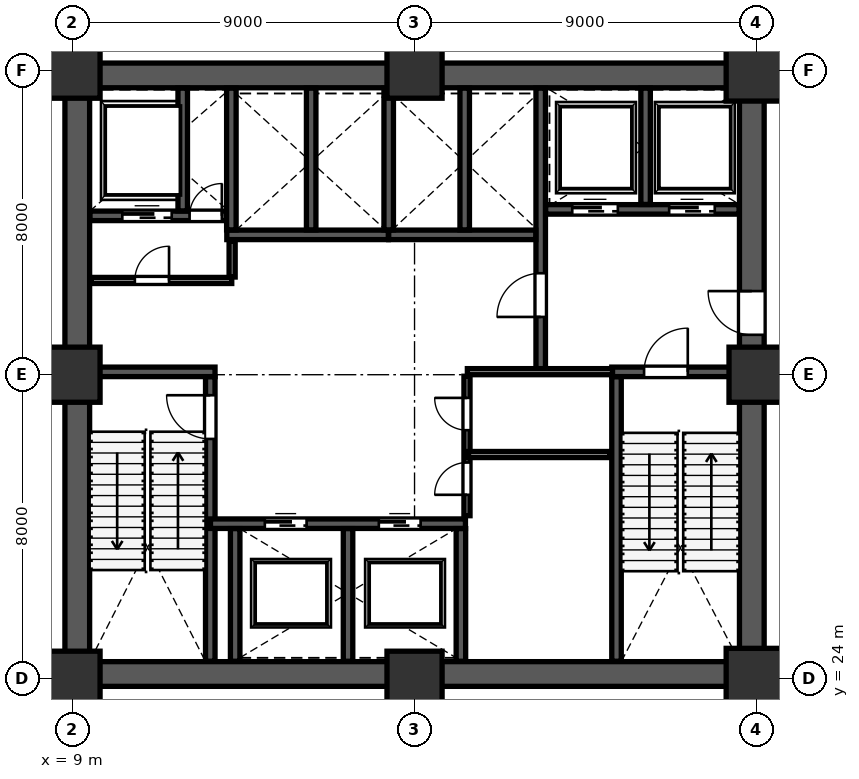
"""IFC4 building model, lengths in metres.
Left out: names, types, materials, properties, quantities, classifications, styles, units other than length and angle.
Written with IfcOpenShell. Run it as: python <this file> out.ifc"""

import sys

from ifc_helpers import new_model, si_unit, direction, frame, frame_2d, origin, origin_2d, place, context, subcontext, project, spatial, rectangle, extrude, source, transform, mapped, element, fill, save


model = new_model("IFC4")
c1 = context("Model", 3, precision=1e-05, world=origin(), true_north=direction((0.0, 1.0)))
c2 = subcontext(c1, "Body", "Model", "MODEL_VIEW")
j1 = project(units=[si_unit("LENGTHUNIT", "METRE"), si_unit("PLANEANGLEUNIT", "RADIAN")], contexts=[c1])
p1 = place(None, origin())
s1 = spatial("IfcSite", under=j1, at=p1, CompositionType="ELEMENT")
p2 = place(p1, origin())
s2 = spatial("IfcBuilding", under=s1, at=p2, CompositionType="ELEMENT")
p3 = place(p2, frame((0.0, 0.0, 28.0)))
s3 = spatial("IfcBuildingStorey", under=s2, at=p3, CompositionType="ELEMENT", Elevation=28.0)
m1 = source(origin(), c2, "Body", "SweptSolid", [
    extrude(rectangle(XDim=1.45, YDim=1.45, at=origin_2d()), origin(), (0.0, 0.0, 1.0), 4.799),
])
p4 = place(p3, frame((9.0, 24.0, 0.001), z_axis=(0.0, 0.0, 1.0), x_axis=(1.0, 0.0, 0.0)))
e1 = element("IfcColumn", 1, at=p4, inside=s3, PredefinedType="COLUMN", context=c2, shape_type="MappedRepresentation", body=[
    mapped(m1, transform((0.0, 0.0, 0.0), scale=1.0)),
])
m2 = source(origin(), c2, "Body", "SweptSolid", [
    extrude(rectangle(XDim=1.45, YDim=1.45, at=origin_2d()), origin(), (0.0, 0.0, 1.0), 4.599),
])
p5 = place(p3, frame((9.0, 32.0, 0.001), z_axis=(0.0, 0.0, 1.0), x_axis=(1.0, 0.0, 0.0)))
e2 = element("IfcColumn", 2, at=p5, inside=s3, PredefinedType="COLUMN", context=c2, shape_type="MappedRepresentation", body=[
    mapped(m2, transform((0.0, 0.0, 0.0), scale=1.0)),
])
m3 = source(origin(), c2, "Body", "SweptSolid", [
    extrude(rectangle(XDim=1.45, YDim=1.45, at=origin_2d()), origin(), (0.0, 0.0, 1.0), 4.799),
])
p6 = place(p3, frame((9.0, 40.0, 0.001), z_axis=(0.0, 0.0, 1.0), x_axis=(1.0, 0.0, 0.0)))
e3 = element("IfcColumn", 3, at=p6, inside=s3, PredefinedType="COLUMN", context=c2, shape_type="MappedRepresentation", body=[
    mapped(m3, transform((0.0, 0.0, 0.0), scale=1.0)),
])
m4 = source(origin(), c2, "Body", "SweptSolid", [
    extrude(rectangle(XDim=1.45, YDim=1.45, at=origin_2d()), origin(), (0.0, 0.0, 1.0), 4.599),
])
p7 = place(p3, frame((18.0, 24.0, 0.001), z_axis=(0.0, 0.0, 1.0), x_axis=(1.0, 0.0, 0.0)))
e4 = element("IfcColumn", 4, at=p7, inside=s3, PredefinedType="COLUMN", context=c2, shape_type="MappedRepresentation", body=[
    mapped(m4, transform((0.0, 0.0, 0.0), scale=1.0)),
])
p8 = place(p3, frame((18.0, 40.0, 0.001), z_axis=(0.0, 0.0, 1.0), x_axis=(1.0, 0.0, 0.0)))
e5 = element("IfcColumn", 5, at=p8, inside=s3, PredefinedType="COLUMN", context=c2, shape_type="MappedRepresentation", body=[
    mapped(m2, transform((0.0, 0.0, 0.0), scale=1.0)),
])
m5 = source(origin(), c2, "Body", "SweptSolid", [
    extrude(rectangle(XDim=1.6, YDim=1.6, at=origin_2d()), origin(), (0.0, 0.0, 1.0), 4.799),
])
p9 = place(p3, frame((27.0, 24.0, 0.001), z_axis=(0.0, 0.0, 1.0), x_axis=(1.0, 0.0, 0.0)))
e6 = element("IfcColumn", 6, at=p9, inside=s3, PredefinedType="COLUMN", context=c2, shape_type="MappedRepresentation", body=[
    mapped(m5, transform((0.0, 0.0, 0.0), scale=1.0)),
])
p10 = place(p3, frame((27.0, 32.0, 0.001), z_axis=(0.0, 0.0, 1.0), x_axis=(1.0, 0.0, 0.0)))
e7 = element("IfcColumn", 7, at=p10, inside=s3, PredefinedType="COLUMN", context=c2, shape_type="MappedRepresentation", body=[
    mapped(m2, transform((0.0, 0.0, 0.0), scale=1.0)),
])
m6 = source(origin(), c2, "Body", "SweptSolid", [
    extrude(rectangle(XDim=1.6, YDim=1.6, at=origin_2d()), origin(), (0.0, 0.0, 1.0), 4.799),
])
p11 = place(p3, frame((27.0, 40.0, 0.001), z_axis=(0.0, 0.0, 1.0), x_axis=(1.0, 0.0, 0.0)))
e8 = element("IfcColumn", 8, at=p11, inside=s3, PredefinedType="COLUMN", context=c2, shape_type="MappedRepresentation", body=[
    mapped(m6, transform((0.0, 0.0, 0.0), scale=1.0)),
])
p12 = place(p3, frame((9.125, 24.45, 0.0), z_axis=(0.0, 0.0, 1.0), x_axis=(0.0, 1.0, 0.0)))
e9 = element("IfcWall", 9, at=p12, inside=s3, PredefinedType="SHEAR", context=c2, shape_type="SweptSolid", body=[
    extrude(rectangle(XDim=15.1, YDim=0.65, at=frame_2d((7.55, 0.0))), origin(), (0.0, 0.0, 1.0), 4.56),
])
p13 = place(p3, frame((26.875, 24.45, 0.0), z_axis=(0.0, 0.0, 1.0), x_axis=(0.0, 1.0, 0.0)))
e10 = element("IfcWall", 10, at=p13, inside=s3, PredefinedType="SHEAR", context=c2, shape_type="SweptSolid", body=[
    extrude(rectangle(XDim=15.1, YDim=0.65, at=frame_2d((7.55, 0.0))), origin(), (0.0, 0.0, 1.0), 4.56),
])
p14 = place(p13, frame((8.6, 0.0, 0.0)))
e11 = element("IfcOpeningElement", 11, at=p14, cuts=e10, PredefinedType="OPENING", context=c2, shape_type="SweptSolid", body=[
    extrude(rectangle(XDim=1.15, YDim=2.2, at=frame_2d((0.575, 1.1))), frame((0.0, 0.335, 0.0), z_axis=(0.0, -1.0, 0.0), x_axis=(1.0, 0.0, 0.0)), (0.0, 0.0, 1.0), 0.67),
])
for number, where, z_axis, x_axis in (
    (12, (8.8, 24.125, 0.0), (0.0, 0.0, 1.0), (1.0, 0.0, 0.0)),
    (13, (8.8, 39.875, 0.0), (0.0, 0.0, 1.0), (1.0, 0.0, 0.0)),
):
    element("IfcWall", number, at=place(p3, frame(where, z_axis=z_axis, x_axis=x_axis)), inside=s3, PredefinedType="SHEAR", context=c2, shape_type="SweptSolid", body=[
        extrude(rectangle(XDim=18.4, YDim=0.65, at=frame_2d((9.2, 0.0))), origin(), (0.0, 0.0, 1.0), 4.56),
    ])
p15 = place(p3, frame((12.625, 24.46, 0.0), z_axis=(0.0, 0.0, 1.0), x_axis=(0.0, 1.0, 0.0)))
e14 = element("IfcWall", 14, at=p15, inside=s3, PredefinedType="SHEAR", context=c2, shape_type="SweptSolid", body=[
    extrude(rectangle(XDim=7.49, YDim=0.25, at=frame_2d((3.745, 0.0))), origin(), (0.0, 0.0, 1.0), 4.56),
])
p16 = place(p15, frame((5.85, 0.0, 0.0)))
e15 = element("IfcOpeningElement", 15, at=p16, cuts=e14, PredefinedType="OPENING", context=c2, shape_type="SweptSolid", body=[
    extrude(rectangle(XDim=1.15, YDim=2.2, at=frame_2d((0.575, 1.1))), frame((0.0, 0.135, 0.0), z_axis=(0.0, -1.0, 0.0), x_axis=(1.0, 0.0, 0.0)), (0.0, 0.0, 1.0), 0.27),
])
p17 = place(p3, frame((9.46, 32.075, 0.0), z_axis=(0.0, 0.0, 1.0), x_axis=(1.0, 0.0, 0.0)))
e16 = element("IfcWall", 16, at=p17, inside=s3, PredefinedType="SHEAR", context=c2, shape_type="SweptSolid", body=[
    extrude(rectangle(XDim=3.29, YDim=0.25, at=frame_2d((1.645, 0.0))), origin(), (0.0, 0.0, 1.0), 4.56),
])
p18 = place(p3, frame((23.315, 24.46, 0.0), z_axis=(0.0, 0.0, 1.0), x_axis=(0.0, 1.0, 0.0)))
e17 = element("IfcWall", 17, at=p18, inside=s3, PredefinedType="SHEAR", context=c2, shape_type="SweptSolid", body=[
    extrude(rectangle(XDim=7.49, YDim=0.25, at=frame_2d((3.745, 0.0))), origin(), (0.0, 0.0, 1.0), 4.56),
])
p19 = place(p3, frame((23.19, 32.075, 0.0), z_axis=(0.0, 0.0, 1.0), x_axis=(1.0, 0.0, 0.0)))
e18 = element("IfcWall", 18, at=p19, inside=s3, PredefinedType="SHEAR", context=c2, shape_type="SweptSolid", body=[
    extrude(rectangle(XDim=3.35, YDim=0.25, at=frame_2d((1.675, 0.0))), origin(), (0.0, 0.0, 1.0), 4.56),
])
p20 = place(p19, frame((0.85, 0.0, 0.0)))
e19 = element("IfcOpeningElement", 19, at=p20, cuts=e18, PredefinedType="OPENING", context=c2, shape_type="SweptSolid", body=[
    extrude(rectangle(XDim=1.15, YDim=2.2, at=frame_2d((0.575, 1.1))), frame((0.0, 0.135, 0.0), z_axis=(0.0, -1.0, 0.0), x_axis=(1.0, 0.0, 0.0)), (0.0, 0.0, 1.0), 0.27),
])
p21 = place(p3, frame((21.32, 32.12, 0.0), z_axis=(0.0, 0.0, 1.0), x_axis=(0.0, 1.0, 0.0)))
e20 = element("IfcWall", 20, at=p21, inside=s3, PredefinedType="SHEAR", context=c2, shape_type="SweptSolid", body=[
    extrude(rectangle(XDim=7.42, YDim=0.25, at=frame_2d((3.71, 0.0))), origin(), (0.0, 0.0, 1.0), 4.56),
])
p22 = place(p21, frame((1.4, 0.0, 0.0)))
e21 = element("IfcOpeningElement", 21, at=p22, cuts=e20, PredefinedType="OPENING", context=c2, shape_type="SweptSolid", body=[
    extrude(rectangle(XDim=1.15, YDim=2.2, at=frame_2d((0.575, 1.1))), frame((0.0, 0.135, 0.0), z_axis=(0.0, -1.0, 0.0), x_axis=(1.0, 0.0, 0.0)), (0.0, 0.0, 1.0), 0.27),
])
p23 = place(p3, frame((9.46, 36.18, 0.0), z_axis=(0.0, 0.0, 1.0), x_axis=(1.0, 0.0, 0.0)))
e22 = element("IfcWall", 22, at=p23, inside=s3, PredefinedType="SHEAR", context=c2, shape_type="SweptSolid", body=[
    extrude(rectangle(XDim=3.79, YDim=0.25, at=frame_2d((1.895, 0.0))), origin(), (0.0, 0.0, 1.0), 4.56),
])
p24 = place(p23, frame((2.62, 0.0, 0.0)))
e23 = element("IfcOpeningElement", 23, at=p24, cuts=e22, PredefinedType="OPENING", context=c2, shape_type="SweptSolid", body=[
    extrude(rectangle(XDim=0.85, YDim=2.1, at=frame_2d((0.425, 1.05))), frame((0.0, 0.135, 0.0), z_axis=(0.0, -1.0, 0.0), x_axis=(1.0, 0.0, 0.0)), (0.0, 0.0, 1.0), 0.27),
])
p25 = place(p23, frame((0.85, 0.0, 0.0)))
e24 = element("IfcOpeningElement", 24, at=p25, cuts=e22, PredefinedType="OPENING", context=c2, shape_type="SweptSolid", body=[
    extrude(rectangle(XDim=1.3, YDim=2.25, at=frame_2d((0.65, 1.125))), frame((0.0, 0.135, 0.0), z_axis=(0.0, -1.0, 0.0), x_axis=(1.0, 0.0, 0.0)), (0.0, 0.0, 1.0), 0.27),
])
p26 = place(p3, frame((11.9, 36.31, 0.0), z_axis=(0.0, 0.0, 1.0), x_axis=(0.0, 1.0, 0.0)))
e25 = element("IfcWall", 25, at=p26, inside=s3, PredefinedType="SHEAR", context=c2, shape_type="SweptSolid", body=[
    extrude(rectangle(XDim=3.23, YDim=0.25, at=frame_2d((1.615, 0.0))), origin(), (0.0, 0.0, 1.0), 4.56),
])
p27 = place(p3, frame((21.45, 36.35, 0.0), z_axis=(0.0, 0.0, 1.0), x_axis=(1.0, 0.0, 0.0)))
e26 = element("IfcWall", 26, at=p27, inside=s3, PredefinedType="SHEAR", context=c2, shape_type="SweptSolid", body=[
    extrude(rectangle(XDim=5.09, YDim=0.25, at=frame_2d((2.545, 0.0))), origin(), (0.0, 0.0, 1.0), 4.56),
])
p28 = place(p27, frame((0.7, 0.0, 0.0)))
e27 = element("IfcOpeningElement", 27, at=p28, cuts=e26, PredefinedType="OPENING", context=c2, shape_type="SweptSolid", body=[
    extrude(rectangle(XDim=1.2, YDim=2.2, at=frame_2d((0.6, 1.1))), frame((0.0, 0.135, 0.0), z_axis=(0.0, -1.0, 0.0), x_axis=(1.0, 0.0, 0.0)), (0.0, 0.0, 1.0), 0.27),
])
p29 = place(p27, frame((3.25, 0.0, 0.0)))
e28 = element("IfcOpeningElement", 28, at=p29, cuts=e26, PredefinedType="OPENING", context=c2, shape_type="SweptSolid", body=[
    extrude(rectangle(XDim=1.2, YDim=2.2, at=frame_2d((0.6, 1.1))), frame((0.0, 0.135, 0.0), z_axis=(0.0, -1.0, 0.0), x_axis=(1.0, 0.0, 0.0)), (0.0, 0.0, 1.0), 0.27),
])
p30 = place(p3, frame((24.08, 36.48, 0.0), z_axis=(0.0, 0.0, 1.0), x_axis=(0.0, 1.0, 0.0)))
e29 = element("IfcWall", 29, at=p30, inside=s3, PredefinedType="SHEAR", context=c2, shape_type="SweptSolid", body=[
    extrude(rectangle(XDim=3.06, YDim=0.25, at=frame_2d((1.53, 0.0))), origin(), (0.0, 0.0, 1.0), 4.56),
])
p31 = place(p3, frame((12.63, 28.08, 0.0), z_axis=(0.0, 0.0, 1.0), x_axis=(1.0, 0.0, 0.0)))
e30 = element("IfcWall", 30, at=p31, inside=s3, PredefinedType="SHEAR", context=c2, shape_type="SweptSolid", body=[
    extrude(rectangle(XDim=6.71, YDim=0.25, at=frame_2d((3.355, 0.0))), origin(), (0.0, 0.0, 1.0), 4.56),
])
p32 = place(p31, frame((1.43, 0.0, 0.0)))
e31 = element("IfcOpeningElement", 31, at=p32, cuts=e30, PredefinedType="OPENING", context=c2, shape_type="SweptSolid", body=[
    extrude(rectangle(XDim=1.1, YDim=2.2, at=frame_2d((0.55, 1.1))), frame((0.0, 0.135, 0.0), z_axis=(0.0, -1.0, 0.0), x_axis=(1.0, 0.0, 0.0)), (0.0, 0.0, 1.0), 0.27),
])
p33 = place(p31, frame((4.43, 0.0, 0.0)))
e32 = element("IfcOpeningElement", 32, at=p33, cuts=e30, PredefinedType="OPENING", context=c2, shape_type="SweptSolid", body=[
    extrude(rectangle(XDim=1.1, YDim=2.2, at=frame_2d((0.55, 1.1))), frame((0.0, 0.135, 0.0), z_axis=(0.0, -1.0, 0.0), x_axis=(1.0, 0.0, 0.0)), (0.0, 0.0, 1.0), 0.27),
])
for number, where, z_axis, x_axis in (
    (33, (13.28, 24.46, 0.0), (0.0, 0.0, 1.0), (0.0, 1.0, 0.0)),
    (34, (16.25, 24.46, 0.0), (0.0, 0.0, 1.0), (0.0, 1.0, 0.0)),
    (35, (19.22, 24.46, 0.0), (0.0, 0.0, 1.0), (0.0, 1.0, 0.0)),
):
    element("IfcWall", number, at=place(p3, frame(where, z_axis=z_axis, x_axis=x_axis)), inside=s3, PredefinedType="SHEAR", context=c2, shape_type="SweptSolid", body=[
        extrude(rectangle(XDim=3.49, YDim=0.25, at=frame_2d((1.745, 0.0))), origin(), (0.0, 0.0, 1.0), 4.56),
    ])
p34 = place(p3, frame((13.06, 35.68, 0.0), z_axis=(0.0, 0.0, 1.0), x_axis=(1.0, 0.0, 0.0)))
e36 = element("IfcWall", 36, at=p34, inside=s3, PredefinedType="SHEAR", context=c2, shape_type="SweptSolid", body=[
    extrude(rectangle(XDim=4.25, YDim=0.25, at=frame_2d((2.125, 0.0))), origin(), (0.0, 0.0, 1.0), 4.56),
])
for number, where, z_axis, x_axis in (
    (37, (13.18, 35.81, 0.0), (0.0, 0.0, 1.0), (0.0, 1.0, 0.0)),
    (38, (15.28, 35.81, 0.0), (0.0, 0.0, 1.0), (0.0, 1.0, 0.0)),
):
    element("IfcWall", number, at=place(p3, frame(where, z_axis=z_axis, x_axis=x_axis)), inside=s3, PredefinedType="SHEAR", context=c2, shape_type="SweptSolid", body=[
        extrude(rectangle(XDim=3.73, YDim=0.25, at=frame_2d((1.865, 0.0))), origin(), (0.0, 0.0, 1.0), 4.56),
    ])
p35 = place(p3, frame((17.32, 35.68, 0.0), z_axis=(0.0, 0.0, 1.0), x_axis=(1.0, 0.0, 0.0)))
e39 = element("IfcWall", 39, at=p35, inside=s3, PredefinedType="SHEAR", context=c2, shape_type="SweptSolid", body=[
    extrude(rectangle(XDim=3.87, YDim=0.25, at=frame_2d((1.935, 0.0))), origin(), (0.0, 0.0, 1.0), 4.56),
])
for number, where, z_axis, x_axis in (
    (40, (17.32, 35.81, 0.0), (0.0, 0.0, 1.0), (0.0, 1.0, 0.0)),
    (41, (19.32, 35.81, 0.0), (0.0, 0.0, 1.0), (0.0, 1.0, 0.0)),
):
    element("IfcWall", number, at=place(p3, frame(where, z_axis=z_axis, x_axis=x_axis)), inside=s3, PredefinedType="SHEAR", context=c2, shape_type="SweptSolid", body=[
        extrude(rectangle(XDim=3.73, YDim=0.25, at=frame_2d((1.865, 0.0))), origin(), (0.0, 0.0, 1.0), 4.56),
    ])
p36 = place(p3, frame((9.49, 34.48, 0.0), z_axis=(0.0, 0.0, 1.0), x_axis=(1.0, 0.0, 0.0)))
e42 = element("IfcWall", 42, at=p36, inside=s3, PredefinedType="PARTITIONING", context=c2, shape_type="SweptSolid", body=[
    extrude(rectangle(XDim=3.7, YDim=0.16, at=frame_2d((1.85, 0.0))), origin(), (0.0, 0.0, 1.0), 4.56),
])
p37 = place(p36, frame((1.15, 0.0, 0.0)))
e43 = element("IfcOpeningElement", 43, at=p37, cuts=e42, PredefinedType="OPENING", context=c2, shape_type="SweptSolid", body=[
    extrude(rectangle(XDim=0.9, YDim=2.15, at=frame_2d((0.45, 1.075))), frame((0.0, 0.09, 0.0), z_axis=(0.0, -1.0, 0.0), x_axis=(1.0, 0.0, 0.0)), (0.0, 0.0, 1.0), 0.18),
])
p38 = place(p3, frame((13.2, 34.57, 0.0), z_axis=(0.0, 0.0, 1.0), x_axis=(0.0, 1.0, 0.0)))
e44 = element("IfcWall", 44, at=p38, inside=s3, PredefinedType="PARTITIONING", context=c2, shape_type="SweptSolid", body=[
    extrude(rectangle(XDim=0.94, YDim=0.16, at=frame_2d((0.47, 0.0))), origin(), (0.0, 0.0, 1.0), 4.56),
])
p39 = place(p3, frame((19.39, 32.08, 0.0), z_axis=(0.0, 0.0, 1.0), x_axis=(1.0, 0.0, 0.0)))
e45 = element("IfcWall", 45, at=p39, inside=s3, PredefinedType="PARTITIONING", context=c2, shape_type="SweptSolid", body=[
    extrude(rectangle(XDim=3.82, YDim=0.16, at=frame_2d((1.91, 0.0))), origin(), (0.0, 0.0, 1.0), 4.56),
])
p40 = place(p3, frame((19.38, 28.29, 0.0), z_axis=(0.0, 0.0, 1.0), x_axis=(0.0, 1.0, 0.0)))
e46 = element("IfcWall", 46, at=p40, inside=s3, PredefinedType="PARTITIONING", context=c2, shape_type="SweptSolid", body=[
    extrude(rectangle(XDim=3.67, YDim=0.16, at=frame_2d((1.835, 0.0))), origin(), (0.0, 0.0, 1.0), 4.56),
])
p41 = place(p40, frame((0.55, 0.0, 0.0)))
e47 = element("IfcOpeningElement", 47, at=p41, cuts=e46, PredefinedType="OPENING", context=c2, shape_type="SweptSolid", body=[
    extrude(rectangle(XDim=0.85, YDim=2.1, at=frame_2d((0.425, 1.05))), frame((0.0, 0.09, 0.0), z_axis=(0.0, -1.0, 0.0), x_axis=(1.0, 0.0, 0.0)), (0.0, 0.0, 1.0), 0.18),
])
p42 = place(p40, frame((2.25, 0.0, 0.0)))
e48 = element("IfcOpeningElement", 48, at=p42, cuts=e46, PredefinedType="OPENING", context=c2, shape_type="SweptSolid", body=[
    extrude(rectangle(XDim=0.85, YDim=2.1, at=frame_2d((0.425, 1.05))), frame((0.0, 0.09, 0.0), z_axis=(0.0, -1.0, 0.0), x_axis=(1.0, 0.0, 0.0)), (0.0, 0.0, 1.0), 0.18),
])
p43 = place(p3, frame((19.42, 29.9, 0.0), z_axis=(0.0, 0.0, 1.0), x_axis=(1.0, 0.0, 0.0)))
e49 = element("IfcWall", 49, at=p43, inside=s3, PredefinedType="PARTITIONING", context=c2, shape_type="SweptSolid", body=[
    extrude(rectangle(XDim=3.72, YDim=0.16, at=frame_2d((1.86, 0.0))), origin(), (0.0, 0.0, 1.0), 4.56),
])
m7 = source(origin(), c2, "Body", "SweptSolid", [
    extrude(rectangle(XDim=1.15, YDim=2.2, at=frame_2d((0.575, 1.1))), frame((0.0, 0.025, 0.0), z_axis=(0.0, -1.0, 0.0), x_axis=(1.0, 0.0, 0.0)), (0.0, 0.0, 1.0), 0.05),
])
p44 = place(p16, origin())
e50 = element("IfcDoor", 50, at=p44, inside=s3, OperationType="SINGLE_SWING_RIGHT", PredefinedType="DOOR", context=c2, shape_type="MappedRepresentation", body=[
    mapped(m7, transform((0.0, 0.0, 0.0), scale=1.0)),
])
fill(e15, e50)
m8 = source(origin(), c2, "Body", "SweptSolid", [
    extrude(rectangle(XDim=1.15, YDim=2.2, at=frame_2d((0.575, 1.1))), frame((0.0, 0.025, 0.0), z_axis=(0.0, -1.0, 0.0), x_axis=(1.0, 0.0, 0.0)), (0.0, 0.0, 1.0), 0.05),
])
p45 = place(p22, origin())
e51 = element("IfcDoor", 51, at=p45, inside=s3, OperationType="SINGLE_SWING_LEFT", PredefinedType="DOOR", context=c2, shape_type="MappedRepresentation", body=[
    mapped(m8, transform((0.0, 0.0, 0.0), scale=1.0)),
])
fill(e21, e51)
p46 = place(p20, origin())
e52 = element("IfcDoor", 52, at=p46, inside=s3, OperationType="SINGLE_SWING_RIGHT", PredefinedType="DOOR", context=c2, shape_type="MappedRepresentation", body=[
    mapped(m7, transform((0.0, 0.0, 0.0), scale=1.0)),
])
fill(e19, e52)
p47 = place(p14, origin())
e53 = element("IfcDoor", 53, at=p47, inside=s3, OperationType="SINGLE_SWING_RIGHT", PredefinedType="DOOR", context=c2, shape_type="MappedRepresentation", body=[
    mapped(m8, transform((0.0, 0.0, 0.0), scale=1.0)),
])
fill(e11, e53)
m9 = source(origin(), c2, "Body", "SweptSolid", [
    extrude(rectangle(XDim=0.85, YDim=2.1, at=frame_2d((0.425, 1.05))), frame((0.0, 0.025, 0.0), z_axis=(0.0, -1.0, 0.0), x_axis=(1.0, 0.0, 0.0)), (0.0, 0.0, 1.0), 0.05),
])
p48 = place(p24, origin())
e54 = element("IfcDoor", 54, at=p48, inside=s3, OperationType="SINGLE_SWING_RIGHT", PredefinedType="DOOR", context=c2, shape_type="MappedRepresentation", body=[
    mapped(m9, transform((0.0, 0.0, 0.0), scale=1.0)),
])
fill(e23, e54)
m10 = source(origin(), c2, "Body", "SweptSolid", [
    extrude(rectangle(XDim=1.1, YDim=2.2, at=frame_2d((0.55, 1.1))), frame((0.0, 0.025, 0.0), z_axis=(0.0, -1.0, 0.0), x_axis=(1.0, 0.0, 0.0)), (0.0, 0.0, 1.0), 0.05),
])
p49 = place(p32, origin())
e55 = element("IfcDoor", 55, at=p49, inside=s3, OperationType="SLIDING_TO_LEFT", PredefinedType="DOOR", context=c2, shape_type="MappedRepresentation", body=[
    mapped(m10, transform((0.0, 0.0, 0.0), scale=1.0)),
])
fill(e31, e55)
p50 = place(p33, origin())
e56 = element("IfcDoor", 56, at=p50, inside=s3, OperationType="SLIDING_TO_RIGHT", PredefinedType="DOOR", context=c2, shape_type="MappedRepresentation", body=[
    mapped(m10, transform((0.0, 0.0, 0.0), scale=1.0)),
])
fill(e32, e56)
m11 = source(origin(), c2, "Body", "SweptSolid", [
    extrude(rectangle(XDim=1.2, YDim=2.2, at=frame_2d((0.6, 1.1))), frame((0.0, 0.025, 0.0), z_axis=(0.0, -1.0, 0.0), x_axis=(1.0, 0.0, 0.0)), (0.0, 0.0, 1.0), 0.05),
])
p51 = place(p28, origin())
e57 = element("IfcDoor", 57, at=p51, inside=s3, OperationType="SLIDING_TO_LEFT", PredefinedType="DOOR", context=c2, shape_type="MappedRepresentation", body=[
    mapped(m11, transform((0.0, 0.0, 0.0), scale=1.0)),
])
fill(e27, e57)
p52 = place(p29, origin())
e58 = element("IfcDoor", 58, at=p52, inside=s3, OperationType="SLIDING_TO_RIGHT", PredefinedType="DOOR", context=c2, shape_type="MappedRepresentation", body=[
    mapped(m11, transform((0.0, 0.0, 0.0), scale=1.0)),
])
fill(e28, e58)
m12 = source(origin(), c2, "Body", "SweptSolid", [
    extrude(rectangle(XDim=1.3, YDim=2.25, at=frame_2d((0.65, 1.125))), frame((0.0, 0.025, 0.0), z_axis=(0.0, -1.0, 0.0), x_axis=(1.0, 0.0, 0.0)), (0.0, 0.0, 1.0), 0.05),
])
p53 = place(p25, origin())
e59 = element("IfcDoor", 59, at=p53, inside=s3, OperationType="SLIDING_TO_LEFT", PredefinedType="DOOR", context=c2, shape_type="MappedRepresentation", body=[
    mapped(m12, transform((0.0, 0.0, 0.0), scale=1.0)),
])
fill(e24, e59)
m13 = source(origin(), c2, "Body", "SweptSolid", [
    extrude(rectangle(XDim=0.9, YDim=2.15, at=frame_2d((0.45, 1.075))), frame((0.0, 0.025, 0.0), z_axis=(0.0, -1.0, 0.0), x_axis=(1.0, 0.0, 0.0)), (0.0, 0.0, 1.0), 0.05),
])
p54 = place(p37, origin())
e60 = element("IfcDoor", 60, at=p54, inside=s3, OperationType="SINGLE_SWING_RIGHT", PredefinedType="DOOR", context=c2, shape_type="MappedRepresentation", body=[
    mapped(m13, transform((0.0, 0.0, 0.0), scale=1.0)),
])
fill(e43, e60)
p55 = place(p41, origin())
e61 = element("IfcDoor", 61, at=p55, inside=s3, OperationType="SINGLE_SWING_LEFT", PredefinedType="DOOR", context=c2, shape_type="MappedRepresentation", body=[
    mapped(m9, transform((0.0, 0.0, 0.0), scale=1.0)),
])
fill(e47, e61)
p56 = place(p42, origin())
e62 = element("IfcDoor", 62, at=p56, inside=s3, OperationType="SINGLE_SWING_RIGHT", PredefinedType="DOOR", context=c2, shape_type="MappedRepresentation", body=[
    mapped(m9, transform((0.0, 0.0, 0.0), scale=1.0)),
])
fill(e48, e62)
save(model, sys.argv[1])
